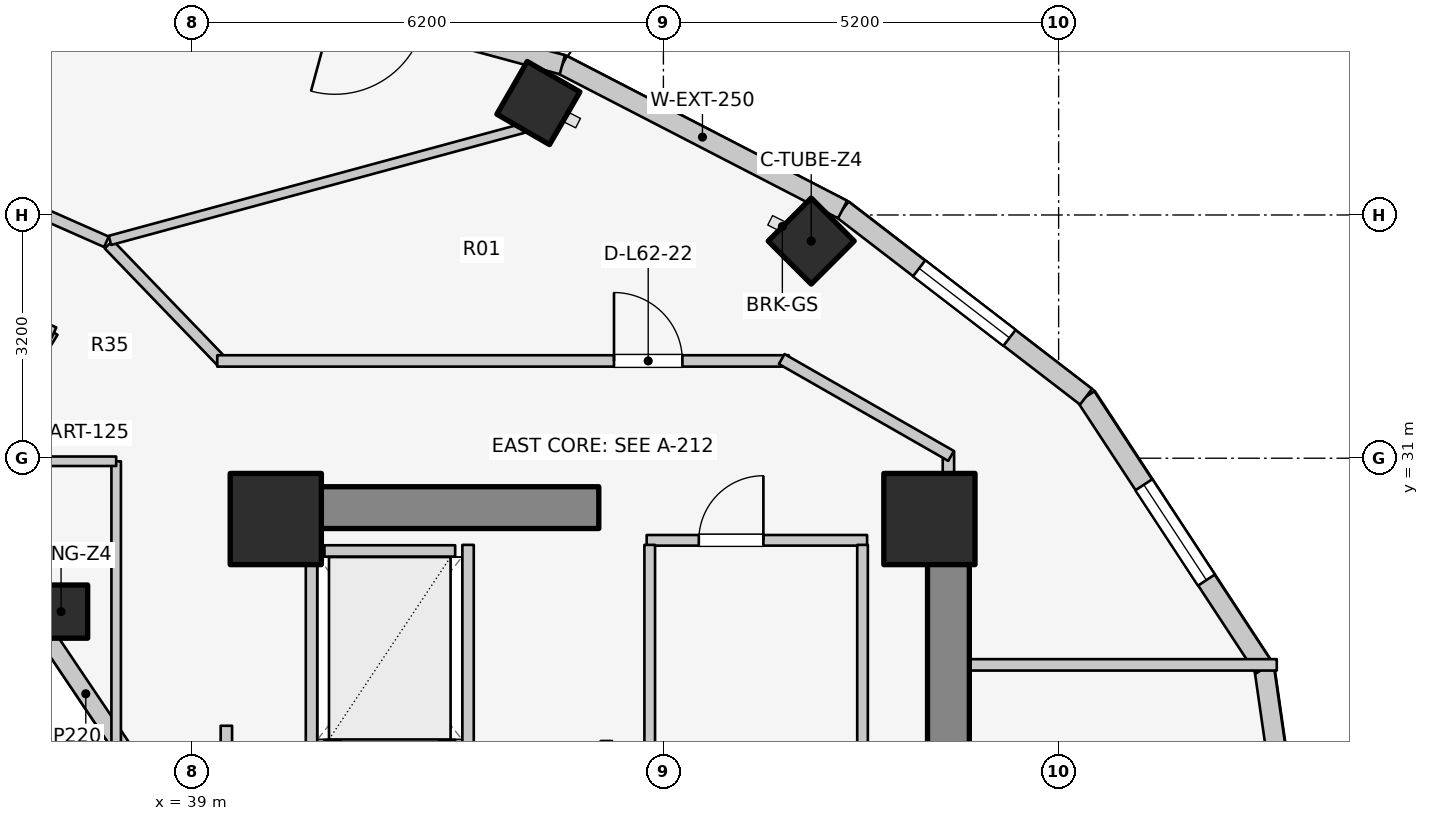
"""IFC4 building model, lengths in metres.
Left out: names, types, materials, properties, quantities, classifications, styles, units other than length and angle.
Written with IfcOpenShell. Run it as: python <this file> out.ifc"""

import sys

from ifc_helpers import new_model, si_unit, direction, frame, frame_2d, origin, origin_2d, place, context, subcontext, project, spatial, rectangle, extrude, element, fill, save


model = new_model("IFC4")
c1 = context("Model", 3, precision=1e-05, world=origin(), true_north=direction((0.0, 1.0)))
c2 = subcontext(c1, "Body", "Model", "MODEL_VIEW")
j1 = project(units=[si_unit("LENGTHUNIT", "METRE"), si_unit("PLANEANGLEUNIT", "RADIAN")], contexts=[c1])
p1 = place(None, origin())
s1 = spatial("IfcSite", under=j1, at=p1, CompositionType="ELEMENT")
p2 = place(p1, origin())
s2 = spatial("IfcBuilding", under=s1, at=p2, CompositionType="ELEMENT")
p3 = place(p2, frame((0.0, 0.0, 204.7)))
s3 = spatial("IfcBuildingStorey", under=s2, at=p3, CompositionType="ELEMENT", Elevation=204.7)
p4 = place(p3, frame((48.95, 17.05, 0.0), z_axis=(0.0, 0.0, 1.0), x_axis=(0.0, 1.0, 0.0)))
e1 = element("IfcWall", 1, at=p4, inside=s3, PredefinedType="SHEAR", context=c2, shape_type="SweptSolid", body=[
    extrude(rectangle(XDim=12.8, YDim=0.55, at=frame_2d((6.4, 0.0))), origin(), (0.0, 0.0, 1.0), 3.1),
])
p5 = place(p3, frame((39.85, 30.35, 0.0), z_axis=(0.0, 0.0, 1.0), x_axis=(1.0, 0.0, 0.0)))
e2 = element("IfcWall", 2, at=p5, inside=s3, PredefinedType="SHEAR", context=c2, shape_type="SweptSolid", body=[
    extrude(rectangle(XDim=4.5, YDim=0.55, at=frame_2d((2.25, 0.0))), origin(), (0.0, 0.0, 1.0), 3.1),
])
for number, where, z_axis, x_axis in (
    (3, (48.7, 30.2, 0.0), (0.0, 0.0, 1.0), (1.0, 0.0, 0.0)),
    (4, (40.1, 30.2, 0.0), (0.0, 0.0, 1.0), (1.0, 0.0, 0.0)),
):
    element("IfcColumn", number, at=place(p3, frame(where, z_axis=z_axis, x_axis=x_axis)), inside=s3, PredefinedType="COLUMN", context=c2, shape_type="SweptSolid", body=[
        extrude(rectangle(XDim=1.2, YDim=1.2, at=origin_2d()), origin(), (0.0, 0.0, 1.0), 3.1),
    ])
p6 = place(p3, frame((37.275, 28.982, 0.0), z_axis=(0.0, 0.0, 1.0), x_axis=(1.0, 0.0, 0.0)))
e5 = element("IfcColumn", 5, at=p6, inside=s3, PredefinedType="COLUMN", context=c2, shape_type="SweptSolid", body=[
    extrude(rectangle(XDim=0.7, YDim=0.7, at=origin_2d()), origin(), (0.0, 0.0, 1.0), 3.1),
])
for number, where, z_axis, x_axis in (
    (6, (47.145, 33.857, 0.0), (0.0, 0.0, 1.0), (0.707, 0.707, 0.0)),
    (7, (43.555, 35.673, 0.0), (0.0, 0.0, 1.0), (0.5, 0.866, 0.0)),
):
    element("IfcColumn", number, at=place(p3, frame(where, z_axis=z_axis, x_axis=x_axis)), inside=s3, PredefinedType="COLUMN", context=c2, shape_type="SweptSolid", body=[
        extrude(rectangle(XDim=0.8, YDim=0.8, at=origin_2d()), origin(), (0.0, 0.0, 1.0), 3.1),
    ])
p7 = place(p3, frame((38.166, 27.06, 0.0), z_axis=(0.0, 0.0, 1.0), x_axis=(-0.558197800898, 0.829707909492, 0.0)))
e8 = element("IfcWall", 8, at=p7, inside=s3, PredefinedType="STANDARD", context=c2, shape_type="SweptSolid", body=[
    extrude(rectangle(XDim=2.027, YDim=0.23, at=frame_2d((1.013, 0.0))), origin(), (0.0, 0.0, 1.0), 2.16),
])
p8 = place(p3, frame((53.86, 23.0, 0.0), z_axis=(0.0, 0.0, 1.0), x_axis=(-0.142712754019, 0.989764148593, 0.0)))
e9 = element("IfcWall", 9, at=p8, inside=s3, PredefinedType="STANDARD", context=c2, shape_type="SweptSolid", body=[
    extrude(rectangle(XDim=5.293, YDim=0.26, at=frame_2d((2.646, 0.0))), origin(), (0.0, 0.0, 1.0), 2.85),
])
p9 = place(p8, frame((1.896, 0.0, 0.75)))
e10 = element("IfcOpeningElement", 10, at=p9, cuts=e9, PredefinedType="OPENING", context=c2, shape_type="SweptSolid", body=[
    extrude(rectangle(XDim=1.5, YDim=1.6, at=frame_2d((0.75, 0.8))), frame((0.0, 0.14, 0.0), z_axis=(0.0, -1.0, 0.0), x_axis=(1.0, 0.0, 0.0)), (0.0, 0.0, 1.0), 0.28),
])
p10 = place(p3, frame((53.105, 28.239, 0.0), z_axis=(0.0, 0.0, 1.0), x_axis=(-0.548776305075, 0.835969238064, 0.0)))
e11 = element("IfcWall", 11, at=p10, inside=s3, PredefinedType="STANDARD", context=c2, shape_type="SweptSolid", body=[
    extrude(rectangle(XDim=4.271, YDim=0.26, at=frame_2d((2.135, 0.0))), origin(), (0.0, 0.0, 1.0), 2.85),
])
p11 = place(p10, frame((1.385, 0.0, 0.75)))
e12 = element("IfcOpeningElement", 12, at=p11, cuts=e11, PredefinedType="OPENING", context=c2, shape_type="SweptSolid", body=[
    extrude(rectangle(XDim=1.5, YDim=1.6, at=frame_2d((0.75, 0.8))), frame((0.0, 0.14, 0.0), z_axis=(0.0, -1.0, 0.0), x_axis=(1.0, 0.0, 0.0)), (0.0, 0.0, 1.0), 0.28),
])
p12 = place(p3, frame((50.761, 31.809, 0.0), z_axis=(0.0, 0.0, 1.0), x_axis=(-0.792713817907, 0.609593965603, 0.0)))
e13 = element("IfcWall", 13, at=p12, inside=s3, PredefinedType="STANDARD", context=c2, shape_type="SweptSolid", body=[
    extrude(rectangle(XDim=4.041, YDim=0.26, at=frame_2d((2.021, 0.0))), origin(), (0.0, 0.0, 1.0), 2.85),
])
p13 = place(p12, frame((1.271, 0.0, 0.75)))
e14 = element("IfcOpeningElement", 14, at=p13, cuts=e13, PredefinedType="OPENING", context=c2, shape_type="SweptSolid", body=[
    extrude(rectangle(XDim=1.5, YDim=1.6, at=frame_2d((0.75, 0.8))), frame((0.0, 0.14, 0.0), z_axis=(0.0, -1.0, 0.0), x_axis=(1.0, 0.0, 0.0)), (0.0, 0.0, 1.0), 0.28),
])
p14 = place(p3, frame((47.558, 34.272, 0.0), z_axis=(0.0, 0.0, 1.0), x_axis=(-0.88849146803, 0.458893137057, 0.0)))
e15 = element("IfcWall", 15, at=p14, inside=s3, PredefinedType="STANDARD", context=c2, shape_type="SweptSolid", body=[
    extrude(rectangle(XDim=4.15, YDim=0.26, at=frame_2d((2.075, 0.0))), origin(), (0.0, 0.0, 1.0), 2.85),
])
p15 = place(p3, frame((43.87, 36.177, 0.0), z_axis=(0.0, 0.0, 1.0), x_axis=(-0.965213026382, 0.261464746576, 0.0)))
e16 = element("IfcWall", 16, at=p15, inside=s3, PredefinedType="STANDARD", context=c2, shape_type="SweptSolid", body=[
    extrude(rectangle(XDim=5.001, YDim=0.26, at=frame_2d((2.5, 0.0))), origin(), (0.0, 0.0, 1.0), 2.88),
])
p16 = place(p15, frame((1.9, 0.0, 0.0)))
e17 = element("IfcOpeningElement", 17, at=p16, cuts=e16, PredefinedType="OPENING", context=c2, shape_type="SweptSolid", body=[
    extrude(rectangle(XDim=1.2, YDim=2.2, at=frame_2d((0.6, 1.1))), frame((0.0, 0.14, 0.0), z_axis=(0.0, -1.0, 0.0), x_axis=(1.0, 0.0, 0.0)), (0.0, 0.0, 1.0), 0.28),
])
p17 = place(p3, frame((40.74, 27.22, 0.0), z_axis=(0.0, 0.0, 1.0), x_axis=(1.0, 0.0, 0.0)))
e18 = element("IfcWall", 18, at=p17, inside=s3, PredefinedType="SOLIDWALL", context=c2, shape_type="SweptSolid", body=[
    extrude(rectangle(XDim=1.72, YDim=0.15, at=frame_2d((0.86, 0.0))), origin(), (0.0, 0.0, 1.0), 2.855),
])
p18 = place(p17, frame((0.21, 0.0, 0.0)))
e19 = element("IfcOpeningElement", 19, at=p18, cuts=e18, PredefinedType="OPENING", context=c2, shape_type="SweptSolid", body=[
    extrude(rectangle(XDim=1.3, YDim=2.1, at=frame_2d((0.65, 1.05))), frame((0.0, 0.085, 0.0), z_axis=(0.0, -1.0, 0.0), x_axis=(1.0, 0.0, 0.0)), (0.0, 0.0, 1.0), 0.17),
])
p19 = place(p3, frame((40.74, 29.78, 0.0), z_axis=(0.0, 0.0, 1.0), x_axis=(1.0, 0.0, 0.0)))
e20 = element("IfcWall", 20, at=p19, inside=s3, PredefinedType="SOLIDWALL", context=c2, shape_type="SweptSolid", body=[
    extrude(rectangle(XDim=1.72, YDim=0.15, at=frame_2d((0.86, 0.0))), origin(), (0.0, 0.0, 1.0), 2.855),
])
for number, where, z_axis, x_axis in (
    (21, (40.57, 27.14, 0.0), (0.0, 0.0, 1.0), (0.0, 1.0, 0.0)),
    (22, (42.63, 27.14, 0.0), (0.0, 0.0, 1.0), (0.0, 1.0, 0.0)),
):
    element("IfcWall", number, at=place(p3, frame(where, z_axis=z_axis, x_axis=x_axis)), inside=s3, PredefinedType="SOLIDWALL", context=c2, shape_type="SweptSolid", body=[
        extrude(rectangle(XDim=2.72, YDim=0.15, at=frame_2d((1.36, 0.0))), origin(), (0.0, 0.0, 1.0), 2.855),
    ])
p20 = place(p3, frame((39.45, 24.08, 0.0), z_axis=(0.0, 0.0, 1.0), x_axis=(0.0, 1.0, 0.0)))
e23 = element("IfcWall", 23, at=p20, inside=s3, PredefinedType="PARTITIONING", context=c2, shape_type="SweptSolid", body=[
    extrude(rectangle(XDim=3.4, YDim=0.15, at=frame_2d((1.7, 0.0))), origin(), (0.0, 0.0, 1.0), 2.855),
])
p21 = place(p20, frame((1.894, 0.0, 0.0)))
e24 = element("IfcOpeningElement", 24, at=p21, cuts=e23, PredefinedType="OPENING", context=c2, shape_type="SweptSolid", body=[
    extrude(rectangle(XDim=1.1, YDim=2.1, at=frame_2d((0.55, 1.05))), frame((0.0, 0.085, 0.0), z_axis=(0.0, -1.0, 0.0), x_axis=(1.0, 0.0, 0.0)), (0.0, 0.0, 1.0), 0.17),
])
p22 = place(p3, frame((44.98, 29.92, 0.0), z_axis=(0.0, 0.0, 1.0), x_axis=(1.0, 0.0, 0.0)))
e25 = element("IfcWall", 25, at=p22, inside=s3, PredefinedType="PLUMBINGWALL", context=c2, shape_type="SweptSolid", body=[
    extrude(rectangle(XDim=2.9, YDim=0.14, at=frame_2d((1.45, 0.0))), origin(), (0.0, 0.0, 1.0), 2.855),
])
p23 = place(p22, frame((0.686, 0.0, 0.0)))
e26 = element("IfcOpeningElement", 26, at=p23, cuts=e25, PredefinedType="OPENING", context=c2, shape_type="SweptSolid", body=[
    extrude(rectangle(XDim=0.85, YDim=2.05, at=frame_2d((0.425, 1.025))), frame((0.0, 0.08, 0.0), z_axis=(0.0, -1.0, 0.0), x_axis=(1.0, 0.0, 0.0)), (0.0, 0.0, 1.0), 0.16),
])
for number, where, z_axis, x_axis in (
    (27, (45.02, 25.98, 0.0), (0.0, 0.0, 1.0), (0.0, 1.0, 0.0)),
    (28, (47.82, 25.98, 0.0), (0.0, 0.0, 1.0), (0.0, 1.0, 0.0)),
):
    element("IfcWall", number, at=place(p3, frame(where, z_axis=z_axis, x_axis=x_axis)), inside=s3, PredefinedType="PLUMBINGWALL", context=c2, shape_type="SweptSolid", body=[
        extrude(rectangle(XDim=3.88, YDim=0.14, at=frame_2d((1.94, 0.0))), origin(), (0.0, 0.0, 1.0), 2.855),
    ])
p24 = place(p3, frame((35.55, 30.015, 0.0), z_axis=(0.0, 0.0, 1.0), x_axis=(0.523992004803, 0.851723182086, 0.0)))
e29 = element("IfcWall", 29, at=p24, inside=s3, PredefinedType="PARTITIONING", context=c2, shape_type="SweptSolid", body=[
    extrude(rectangle(XDim=3.101, YDim=0.125, at=frame_2d((1.551, 0.0))), origin(), (0.0, 0.0, 1.0), 2.376),
])
p25 = place(p3, frame((37.181, 32.652, 0.0), z_axis=(0.0, 0.0, 1.0), x_axis=(-0.913120130558, 0.407690602257, 0.0)))
e30 = element("IfcWall", 30, at=p25, inside=s3, PredefinedType="PARTITIONING", context=c2, shape_type="SweptSolid", body=[
    extrude(rectangle(XDim=2.743, YDim=0.15, at=frame_2d((1.371, 0.0))), origin(), (0.0, 0.0, 1.0), 2.376),
])
p26 = place(p3, frame((38.0, 25.8, 0.0), z_axis=(0.0, 0.0, 1.0), x_axis=(0.0, 1.0, 0.0)))
e31 = element("IfcWall", 31, at=p26, inside=s3, PredefinedType="PARTITIONING", context=c2, shape_type="SweptSolid", body=[
    extrude(rectangle(XDim=5.16, YDim=0.125, at=frame_2d((2.58, 0.0))), origin(), (0.0, 0.0, 1.0), 2.232),
])
p27 = place(p3, frame((35.4, 30.96, 0.0), z_axis=(0.0, 0.0, 1.0), x_axis=(1.0, 0.0, 0.0)))
e32 = element("IfcWall", 32, at=p27, inside=s3, PredefinedType="PARTITIONING", context=c2, shape_type="SweptSolid", body=[
    extrude(rectangle(XDim=2.6, YDim=0.125, at=frame_2d((1.3, 0.0))), origin(), (0.0, 0.0, 1.0), 2.376),
])
p28 = place(p3, frame((48.95, 28.281, 0.0), z_axis=(0.0, 0.0, 1.0), x_axis=(1.0, 0.0, 0.0)))
e33 = element("IfcWall", 33, at=p28, inside=s3, PredefinedType="PARTITIONING", context=c2, shape_type="SweptSolid", body=[
    extrude(rectangle(XDim=4.32, YDim=0.15, at=frame_2d((2.16, 0.0))), origin(), (0.0, 0.0, 1.0), 2.855),
])
p29 = place(p3, frame((48.95, 29.8, 0.0), z_axis=(0.0, 0.0, 1.0), x_axis=(0.0, 1.0, 0.0)))
e34 = element("IfcWall", 34, at=p29, inside=s3, PredefinedType="PARTITIONING", context=c2, shape_type="SweptSolid", body=[
    extrude(rectangle(XDim=1.29, YDim=0.15, at=frame_2d((0.645, 0.0))), origin(), (0.0, 0.0, 1.0), 2.855),
])
p30 = place(p3, frame((37.903, 33.812, 0.0), z_axis=(0.0, 0.0, 1.0), x_axis=(0.694032962553, -0.719943224768, 0.0)))
e35 = element("IfcWall", 35, at=p30, inside=s3, PredefinedType="PARTITIONING", context=c2, shape_type="SweptSolid", body=[
    extrude(rectangle(XDim=2.158, YDim=0.15, at=frame_2d((1.079, 0.0))), origin(), (0.0, 0.0, 1.0), 2.376),
])
p31 = place(p3, frame((39.33, 32.28, 0.0), z_axis=(0.0, 0.0, 1.0), x_axis=(1.0, 0.0, 0.0)))
e36 = element("IfcWall", 36, at=p31, inside=s3, PredefinedType="PARTITIONING", context=c2, shape_type="SweptSolid", body=[
    extrude(rectangle(XDim=7.52, YDim=0.15, at=frame_2d((3.76, 0.0))), origin(), (0.0, 0.0, 1.0), 2.376),
])
p32 = place(p31, frame((5.22, 0.0, 0.0)))
e37 = element("IfcOpeningElement", 37, at=p32, cuts=e36, PredefinedType="OPENING", context=c2, shape_type="SweptSolid", body=[
    extrude(rectangle(XDim=0.9, YDim=2.1, at=frame_2d((0.45, 1.05))), frame((0.0, 0.085, 0.0), z_axis=(0.0, -1.0, 0.0), x_axis=(1.0, 0.0, 0.0)), (0.0, 0.0, 1.0), 0.17),
])
p33 = place(p3, frame((46.757, 32.305, 0.0), z_axis=(0.0, 0.0, 1.0), x_axis=(0.867991349648, -0.496579315857, 0.0)))
e38 = element("IfcWall", 38, at=p33, inside=s3, PredefinedType="PARTITIONING", context=c2, shape_type="SweptSolid", body=[
    extrude(rectangle(XDim=2.567, YDim=0.15, at=frame_2d((1.283, 0.0))), origin(), (0.0, 0.0, 1.0), 2.22),
])
p34 = place(p3, frame((37.918, 33.866, 0.0), z_axis=(0.0, 0.0, 1.0), x_axis=(0.965109390289, 0.261847025523, 0.0)))
e39 = element("IfcWall", 39, at=p34, inside=s3, PredefinedType="PARTITIONING", context=c2, shape_type="SweptSolid", body=[
    extrude(rectangle(XDim=5.644, YDim=0.125, at=frame_2d((2.822, 0.0))), origin(), (0.0, 0.0, 1.0), 2.376),
])
p35 = place(p3, frame((37.872, 33.847, 0.0), z_axis=(0.0, 0.0, 1.0), x_axis=(-0.914490094652, 0.40460828808, 0.0)))
e40 = element("IfcWall", 40, at=p35, inside=s3, PredefinedType="PARTITIONING", context=c2, shape_type="SweptSolid", body=[
    extrude(rectangle(XDim=3.11, YDim=0.15, at=frame_2d((1.555, 0.0))), origin(), (0.0, 0.0, 1.0), 2.376),
])
p36 = place(p11, origin())
e41 = element("IfcWindow", 41, at=p36, inside=s3, PartitioningType="SINGLE_PANEL", PredefinedType="WINDOW", context=c2, shape_type="SweptSolid", body=[
    extrude(rectangle(XDim=1.5, YDim=1.6, at=frame_2d((0.75, 0.8))), frame((0.0, 0.03, 0.0), z_axis=(0.0, -1.0, 0.0), x_axis=(1.0, 0.0, 0.0)), (0.0, 0.0, 1.0), 0.06),
])
fill(e12, e41)
p37 = place(p13, origin())
e42 = element("IfcWindow", 42, at=p37, inside=s3, PartitioningType="SINGLE_PANEL", PredefinedType="WINDOW", context=c2, shape_type="SweptSolid", body=[
    extrude(rectangle(XDim=1.5, YDim=1.6, at=frame_2d((0.75, 0.8))), frame((0.0, 0.03, 0.0), z_axis=(0.0, -1.0, 0.0), x_axis=(1.0, 0.0, 0.0)), (0.0, 0.0, 1.0), 0.06),
])
fill(e14, e42)
p38 = place(p23, origin())
e43 = element("IfcDoor", 43, at=p38, inside=s3, OperationType="SINGLE_SWING_RIGHT", PredefinedType="DOOR", context=c2, shape_type="SweptSolid", body=[
    extrude(rectangle(XDim=0.85, YDim=2.05, at=frame_2d((0.425, 1.025))), frame((0.0, 0.025, 0.0), z_axis=(0.0, -1.0, 0.0), x_axis=(1.0, 0.0, 0.0)), (0.0, 0.0, 1.0), 0.05),
])
fill(e26, e43)
p39 = place(p32, origin())
e44 = element("IfcDoor", 44, at=p39, inside=s3, OperationType="SINGLE_SWING_LEFT", PredefinedType="DOOR", context=c2, shape_type="SweptSolid", body=[
    extrude(rectangle(XDim=0.9, YDim=2.1, at=frame_2d((0.45, 1.05))), frame((0.0, 0.025, 0.0), z_axis=(0.0, -1.0, 0.0), x_axis=(1.0, 0.0, 0.0)), (0.0, 0.0, 1.0), 0.05),
])
fill(e37, e44)
save(model, sys.argv[1])
